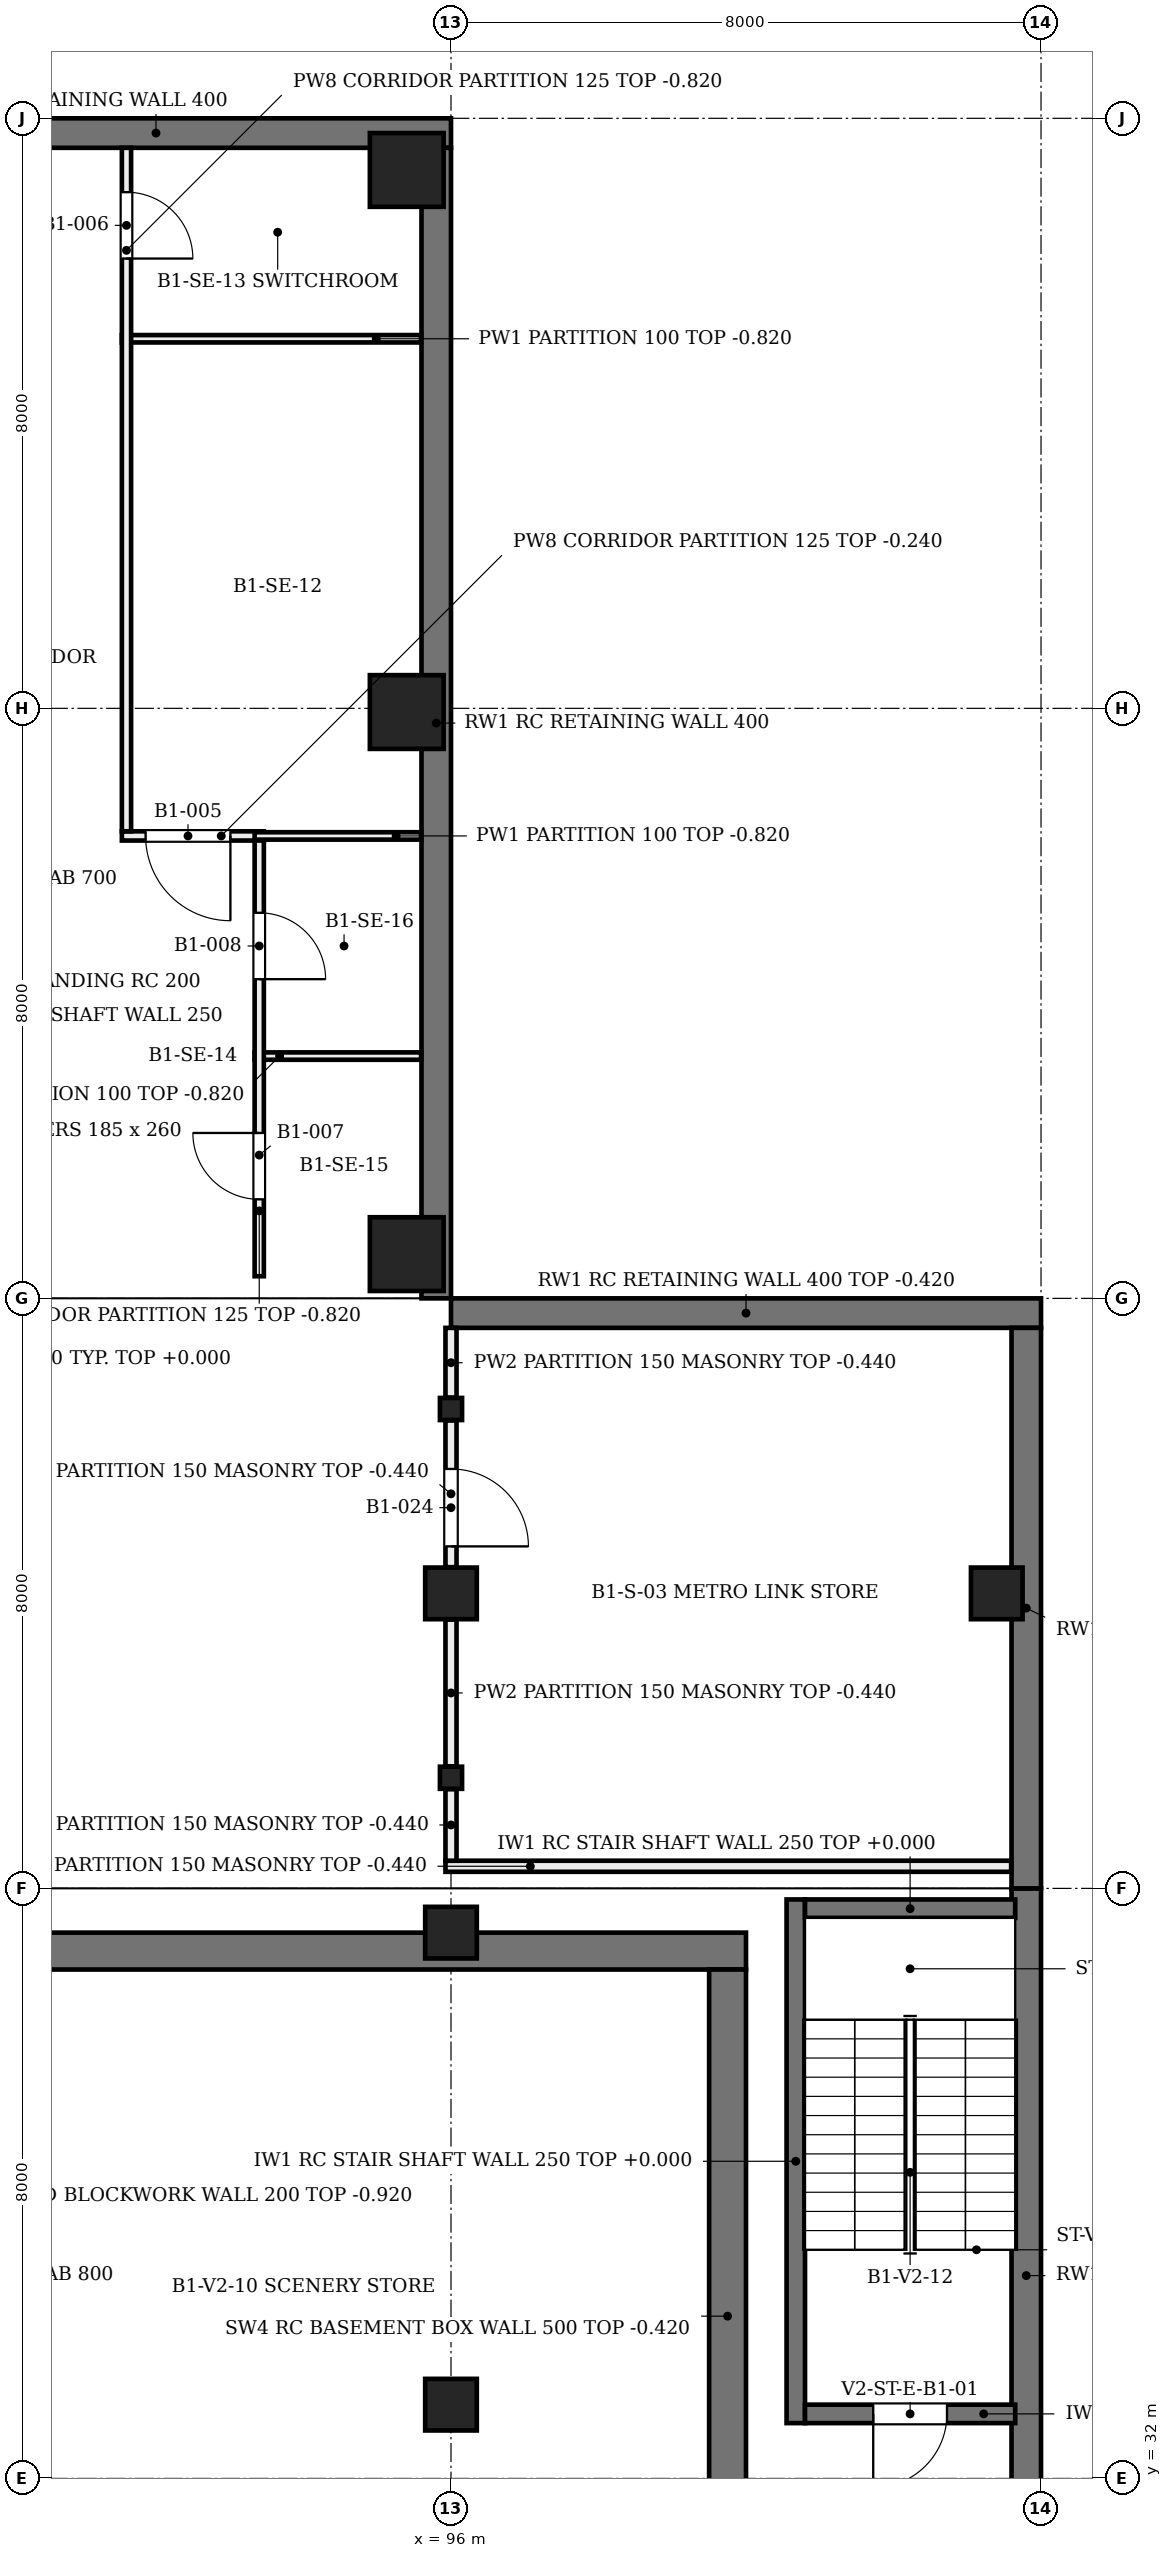
"""IFC4 building model, lengths in metres.
Left out: names, types, materials, properties, quantities, classifications, styles, units other than length and angle.
Written with IfcOpenShell. Run it as: python <this file> out.ifc"""

import sys

from ifc_helpers import new_model, si_unit, direction, frame, frame_2d, origin, origin_2d, place, context, subcontext, project, spatial, rectangle, extrude, element, fill, save


model = new_model("IFC4")
c1 = context("Model", 3, precision=1e-05, world=origin(), true_north=direction((0.0, 1.0)))
c2 = subcontext(c1, "Body", "Model", "MODEL_VIEW")
j1 = project(units=[si_unit("LENGTHUNIT", "METRE"), si_unit("PLANEANGLEUNIT", "RADIAN")], contexts=[c1])
p1 = place(None, origin())
s1 = spatial("IfcSite", under=j1, at=p1, CompositionType="ELEMENT")
p2 = place(p1, origin())
s2 = spatial("IfcBuilding", under=s1, at=p2, CompositionType="ELEMENT")
p3 = place(p2, frame((0.0, 0.0, -4.8)))
s3 = spatial("IfcBuildingStorey", under=s2, at=p3, CompositionType="ELEMENT", Elevation=-4.8)
p4 = place(p3, frame((76.0, 39.15, 0.0), z_axis=(0.0, 0.0, 1.0), x_axis=(1.0, 0.0, 0.0)))
e1 = element("IfcWall", 1, at=p4, inside=s3, PredefinedType="SHEAR", context=c2, shape_type="SweptSolid", body=[
    extrude(rectangle(XDim=24.0, YDim=0.5, at=frame_2d((12.0, 0.0))), origin(), (0.0, 0.0, 1.0), 4.38),
])
p5 = place(p3, frame((99.75, 16.5, 0.0), z_axis=(0.0, 0.0, 1.0), x_axis=(0.0, 1.0, 0.0)))
e2 = element("IfcWall", 2, at=p5, inside=s3, PredefinedType="SHEAR", context=c2, shape_type="SweptSolid", body=[
    extrude(rectangle(XDim=22.4, YDim=0.5, at=frame_2d((11.2, 0.0))), origin(), (0.0, 0.0, 1.0), 4.38),
])
p6 = place(p5, frame((4.575, 0.0, 0.0)))
e3 = element("IfcOpeningElement", 3, at=p6, cuts=e2, PredefinedType="OPENING", context=c2, shape_type="SweptSolid", body=[
    extrude(rectangle(XDim=1.4, YDim=2.4, at=frame_2d((0.7, 1.2))), frame((0.0, 0.26, 0.0), z_axis=(0.0, -1.0, 0.0), x_axis=(1.0, 0.0, 0.0)), (0.0, 0.0, 1.0), 0.52),
])
p7 = place(p5, frame((12.9, 0.0, 0.0)))
e4 = element("IfcOpeningElement", 4, at=p7, cuts=e2, PredefinedType="OPENING", context=c2, shape_type="SweptSolid", body=[
    extrude(rectangle(XDim=1.4, YDim=2.7, at=frame_2d((0.7, 1.35))), frame((0.0, 0.26, 0.0), z_axis=(0.0, -1.0, 0.0), x_axis=(1.0, 0.0, 0.0)), (0.0, 0.0, 1.0), 0.52),
])
for number, where, z_axis, x_axis in (
    (5, (95.4, 48.6, 0.0), (0.0, 0.0, 1.0), (1.0, 0.0, 0.0)),
    (6, (95.4, 55.95, 0.0), (0.0, 0.0, 1.0), (1.0, 0.0, 0.0)),
    (7, (95.4, 63.3, 0.0), (0.0, 0.0, 1.0), (1.0, 0.0, 0.0)),
):
    element("IfcColumn", number, at=place(p3, frame(where, z_axis=z_axis, x_axis=x_axis)), inside=s3, PredefinedType="COLUMN", context=c2, shape_type="SweptSolid", body=[
        extrude(rectangle(XDim=1.0, YDim=1.0, at=origin_2d()), origin(), (0.0, 0.0, 1.0), 4.8),
    ])
p8 = place(p3, frame((96.0, 47.8, 0.0), z_axis=(0.0, 0.0, 1.0), x_axis=(1.0, 0.0, 0.0)))
e8 = element("IfcWall", 8, at=p8, inside=s3, PredefinedType="SOLIDWALL", context=c2, shape_type="SweptSolid", body=[
    extrude(rectangle(XDim=8.0, YDim=0.4, at=frame_2d((4.0, 0.0))), origin(), (0.0, 0.0, 1.0), 4.38),
])
p9 = place(p3, frame((103.8, -1.6, 0.0), z_axis=(0.0, 0.0, 1.0), x_axis=(0.0, 1.0, 0.0)))
e9 = element("IfcWall", 9, at=p9, inside=s3, PredefinedType="SOLIDWALL", context=c2, shape_type="SweptSolid", body=[
    extrude(rectangle(XDim=41.6, YDim=0.4, at=frame_2d((20.8, 0.0))), origin(), (0.0, 0.0, 1.0), 4.38),
])
p10 = place(p3, frame((103.8, 40.0, 0.0), z_axis=(0.0, 0.0, 1.0), x_axis=(0.0, 1.0, 0.0)))
e10 = element("IfcWall", 10, at=p10, inside=s3, PredefinedType="SOLIDWALL", context=c2, shape_type="SweptSolid", body=[
    extrude(rectangle(XDim=7.6, YDim=0.4, at=frame_2d((3.8, 0.0))), origin(), (0.0, 0.0, 1.0), 4.38),
])
p11 = place(p3, frame((88.0, 63.8, 0.0), z_axis=(0.0, 0.0, 1.0), x_axis=(1.0, 0.0, 0.0)))
e11 = element("IfcWall", 11, at=p11, inside=s3, PredefinedType="SOLIDWALL", context=c2, shape_type="SweptSolid", body=[
    extrude(rectangle(XDim=8.0, YDim=0.4, at=frame_2d((4.0, 0.0))), origin(), (0.0, 0.0, 1.0), 4.55),
])
p12 = place(p3, frame((95.8, 48.0, 0.0), z_axis=(0.0, 0.0, 1.0), x_axis=(0.0, 1.0, 0.0)))
e12 = element("IfcWall", 12, at=p12, inside=s3, PredefinedType="SOLIDWALL", context=c2, shape_type="SweptSolid", body=[
    extrude(rectangle(XDim=15.6, YDim=0.4, at=frame_2d((7.8, 0.0))), origin(), (0.0, 0.0, 1.0), 4.55),
])
for number, where, z_axis, x_axis in (
    (13, (96.0, 33.0, 0.0), (0.0, 0.0, 1.0), (1.0, 0.0, 0.0)),
    (14, (96.0, 39.4, 0.0), (0.0, 0.0, 1.0), (1.0, 0.0, 0.0)),
    (15, (96.0, 44.0, 0.0), (0.0, 0.0, 1.0), (1.0, 0.0, 0.0)),
    (16, (103.4, 44.0, 0.0), (0.0, 0.0, 1.0), (1.0, 0.0, 0.0)),
):
    element("IfcColumn", number, at=place(p3, frame(where, z_axis=z_axis, x_axis=x_axis)), inside=s3, PredefinedType="COLUMN", context=c2, shape_type="SweptSolid", body=[
        extrude(rectangle(XDim=0.7, YDim=0.7, at=origin_2d()), origin(), (0.0, 0.0, 1.0), 4.38),
    ])
for number, where, z_axis, x_axis in (
    (17, (96.0, 41.5, 0.0), (0.0, 0.0, 1.0), (1.0, 0.0, 0.0)),
    (18, (96.0, 46.5, 0.0), (0.0, 0.0, 1.0), (1.0, 0.0, 0.0)),
):
    element("IfcColumn", number, at=place(p3, frame(where, z_axis=z_axis, x_axis=x_axis)), inside=s3, PredefinedType="COLUMN", context=c2, shape_type="SweptSolid", body=[
        extrude(rectangle(XDim=0.3, YDim=0.3, at=origin_2d()), origin(), (0.0, 0.0, 1.0), 4.38),
    ])
p13 = place(p3, frame((100.675, 32.75, 0.0), z_axis=(0.0, 0.0, 1.0), x_axis=(0.0, 1.0, 0.0)))
e19 = element("IfcWall", 19, at=p13, inside=s3, PredefinedType="SOLIDWALL", context=c2, shape_type="SweptSolid", body=[
    extrude(rectangle(XDim=7.1, YDim=0.25, at=frame_2d((3.55, 0.0))), origin(), (0.0, 0.0, 1.0), 4.8),
])
p14 = place(p3, frame((100.8, 32.875, 0.0), z_axis=(0.0, 0.0, 1.0), x_axis=(1.0, 0.0, 0.0)))
e20 = element("IfcWall", 20, at=p14, inside=s3, PredefinedType="SOLIDWALL", context=c2, shape_type="SweptSolid", body=[
    extrude(rectangle(XDim=2.85, YDim=0.25, at=frame_2d((1.425, 0.0))), origin(), (0.0, 0.0, 1.0), 4.8),
])
p15 = place(p14, frame((0.925, 0.0, 0.0)))
e21 = element("IfcOpeningElement", 21, at=p15, cuts=e20, PredefinedType="OPENING", context=c2, shape_type="SweptSolid", body=[
    extrude(rectangle(XDim=1.0, YDim=2.1, at=frame_2d((0.5, 1.05))), frame((0.0, 0.135, 0.0), z_axis=(0.0, -1.0, 0.0), x_axis=(1.0, 0.0, 0.0)), (0.0, 0.0, 1.0), 0.27),
])
p16 = place(p3, frame((100.8, 39.725, 0.0), z_axis=(0.0, 0.0, 1.0), x_axis=(1.0, 0.0, 0.0)))
e22 = element("IfcWall", 22, at=p16, inside=s3, PredefinedType="SOLIDWALL", context=c2, shape_type="SweptSolid", body=[
    extrude(rectangle(XDim=2.85, YDim=0.25, at=frame_2d((1.425, 0.0))), origin(), (0.0, 0.0, 1.0), 4.8),
])
p17 = place(p3, frame((91.538, 54.27, 0.0), z_axis=(0.0, 0.0, 1.0), x_axis=(1.0, 0.0, 0.0)))
e23 = element("IfcWall", 23, at=p17, inside=s3, PredefinedType="PARTITIONING", context=c2, shape_type="SweptSolid", body=[
    extrude(rectangle(XDim=1.925, YDim=0.125, at=frame_2d((0.962, 0.0))), origin(), (0.0, 0.0, 1.0), 4.56),
])
p18 = place(p17, frame((0.322, 0.0, 0.0)))
e24 = element("IfcOpeningElement", 24, at=p18, cuts=e23, PredefinedType="OPENING", context=c2, shape_type="SweptSolid", body=[
    extrude(rectangle(XDim=1.15, YDim=2.1, at=frame_2d((0.575, 1.05))), frame((0.0, 0.073, 0.0), z_axis=(0.0, -1.0, 0.0), x_axis=(1.0, 0.0, 0.0)), (0.0, 0.0, 1.0), 0.145),
])
p19 = place(p3, frame((93.337, 54.27, 0.0), z_axis=(0.0, 0.0, 1.0), x_axis=(1.0, 0.0, 0.0)))
e25 = element("IfcWall", 25, at=p19, inside=s3, PredefinedType="PARTITIONING", context=c2, shape_type="SweptSolid", body=[
    extrude(rectangle(XDim=2.258, YDim=0.1, at=frame_2d((1.129, 0.0))), origin(), (0.0, 0.0, 1.0), 3.98),
])
p20 = place(p3, frame((91.538, 61.011, 0.0), z_axis=(0.0, 0.0, 1.0), x_axis=(1.0, 0.0, 0.0)))
e26 = element("IfcWall", 26, at=p20, inside=s3, PredefinedType="PARTITIONING", context=c2, shape_type="SweptSolid", body=[
    extrude(rectangle(XDim=4.057, YDim=0.1, at=frame_2d((2.029, 0.0))), origin(), (0.0, 0.0, 1.0), 3.98),
])
p21 = place(p3, frame((93.337, 51.285, 0.0), z_axis=(0.0, 0.0, 1.0), x_axis=(1.0, 0.0, 0.0)))
e27 = element("IfcWall", 27, at=p21, inside=s3, PredefinedType="PARTITIONING", context=c2, shape_type="SweptSolid", body=[
    extrude(rectangle(XDim=2.258, YDim=0.1, at=frame_2d((1.129, 0.0))), origin(), (0.0, 0.0, 1.0), 3.98),
])
p22 = place(p3, frame((91.6, 54.333, 0.0), z_axis=(0.0, 0.0, 1.0), x_axis=(0.0, 1.0, 0.0)))
e28 = element("IfcWall", 28, at=p22, inside=s3, PredefinedType="PARTITIONING", context=c2, shape_type="SweptSolid", body=[
    extrude(rectangle(XDim=9.267, YDim=0.125, at=frame_2d((4.634, 0.0))), origin(), (0.0, 0.0, 1.0), 3.98),
])
p23 = place(p22, frame((7.766, 0.0, 0.0)))
e29 = element("IfcOpeningElement", 29, at=p23, cuts=e28, PredefinedType="OPENING", context=c2, shape_type="SweptSolid", body=[
    extrude(rectangle(XDim=0.9, YDim=2.1, at=frame_2d((0.45, 1.05))), frame((0.0, 0.073, 0.0), z_axis=(0.0, -1.0, 0.0), x_axis=(1.0, 0.0, 0.0)), (0.0, 0.0, 1.0), 0.145),
])
p24 = place(p3, frame((93.4, 48.3, 0.0), z_axis=(0.0, 0.0, 1.0), x_axis=(0.0, 1.0, 0.0)))
e30 = element("IfcWall", 30, at=p24, inside=s3, PredefinedType="PARTITIONING", context=c2, shape_type="SweptSolid", body=[
    extrude(rectangle(XDim=5.908, YDim=0.125, at=frame_2d((2.954, 0.0))), origin(), (0.0, 0.0, 1.0), 3.98),
])
p25 = place(p24, frame((1.042, 0.0, 0.0)))
e31 = element("IfcOpeningElement", 31, at=p25, cuts=e30, PredefinedType="OPENING", context=c2, shape_type="SweptSolid", body=[
    extrude(rectangle(XDim=0.9, YDim=2.1, at=frame_2d((0.45, 1.05))), frame((0.0, 0.073, 0.0), z_axis=(0.0, -1.0, 0.0), x_axis=(1.0, 0.0, 0.0)), (0.0, 0.0, 1.0), 0.145),
])
p26 = place(p24, frame((4.028, 0.0, 0.0)))
e32 = element("IfcOpeningElement", 32, at=p26, cuts=e30, PredefinedType="OPENING", context=c2, shape_type="SweptSolid", body=[
    extrude(rectangle(XDim=0.9, YDim=2.1, at=frame_2d((0.45, 1.05))), frame((0.0, 0.073, 0.0), z_axis=(0.0, -1.0, 0.0), x_axis=(1.0, 0.0, 0.0)), (0.0, 0.0, 1.0), 0.145),
])
p27 = place(p3, frame((95.925, 40.3, 0.0), z_axis=(0.0, 0.0, 1.0), x_axis=(1.0, 0.0, 0.0)))
e33 = element("IfcWall", 33, at=p27, inside=s3, PredefinedType="PARTITIONING", context=c2, shape_type="SweptSolid", body=[
    extrude(rectangle(XDim=7.67, YDim=0.15, at=frame_2d((3.835, 0.0))), origin(), (0.0, 0.0, 1.0), 4.36),
])
p28 = place(p3, frame((96.0, 40.375, 0.0), z_axis=(0.0, 0.0, 1.0), x_axis=(0.0, 1.0, 0.0)))
e34 = element("IfcWall", 34, at=p28, inside=s3, PredefinedType="PARTITIONING", context=c2, shape_type="SweptSolid", body=[
    extrude(rectangle(XDim=0.97, YDim=0.15, at=frame_2d((0.485, 0.0))), origin(), (0.0, 0.0, 1.0), 4.36),
])
p29 = place(p3, frame((96.0, 41.655, 0.0), z_axis=(0.0, 0.0, 1.0), x_axis=(0.0, 1.0, 0.0)))
e35 = element("IfcWall", 35, at=p29, inside=s3, PredefinedType="PARTITIONING", context=c2, shape_type="SweptSolid", body=[
    extrude(rectangle(XDim=1.99, YDim=0.15, at=frame_2d((0.995, 0.0))), origin(), (0.0, 0.0, 1.0), 4.36),
])
p30 = place(p3, frame((96.0, 44.355, 0.0), z_axis=(0.0, 0.0, 1.0), x_axis=(0.0, 1.0, 0.0)))
e36 = element("IfcWall", 36, at=p30, inside=s3, PredefinedType="PARTITIONING", context=c2, shape_type="SweptSolid", body=[
    extrude(rectangle(XDim=1.99, YDim=0.15, at=frame_2d((0.995, 0.0))), origin(), (0.0, 0.0, 1.0), 4.36),
])
p31 = place(p30, frame((0.282, 0.0, 0.0)))
e37 = element("IfcOpeningElement", 37, at=p31, cuts=e36, PredefinedType="OPENING", context=c2, shape_type="SweptSolid", body=[
    extrude(rectangle(XDim=1.05, YDim=2.1, at=frame_2d((0.525, 1.05))), frame((0.0, 0.085, 0.0), z_axis=(0.0, -1.0, 0.0), x_axis=(1.0, 0.0, 0.0)), (0.0, 0.0, 1.0), 0.17),
])
p32 = place(p3, frame((96.0, 46.655, 0.0), z_axis=(0.0, 0.0, 1.0), x_axis=(0.0, 1.0, 0.0)))
e38 = element("IfcWall", 38, at=p32, inside=s3, PredefinedType="PARTITIONING", context=c2, shape_type="SweptSolid", body=[
    extrude(rectangle(XDim=0.945, YDim=0.15, at=frame_2d((0.473, 0.0))), origin(), (0.0, 0.0, 1.0), 4.36),
])
p33 = place(p15, frame((1.0, 0.0, 0.0), z_axis=(0.0, 0.0, 1.0), x_axis=(-1.0, 0.0, 0.0)))
e39 = element("IfcDoor", 39, at=p33, inside=s3, OperationType="SINGLE_SWING_LEFT", PredefinedType="DOOR", context=c2, shape_type="SweptSolid", body=[
    extrude(rectangle(XDim=1.0, YDim=2.1, at=frame_2d((0.5, 1.05))), frame((0.0, 0.025, 0.0), z_axis=(0.0, -1.0, 0.0), x_axis=(1.0, 0.0, 0.0)), (0.0, 0.0, 1.0), 0.05),
])
fill(e21, e39)
p34 = place(p18, origin())
e40 = element("IfcDoor", 40, at=p34, inside=s3, OperationType="SINGLE_SWING_RIGHT", PredefinedType="DOOR", context=c2, shape_type="SweptSolid", body=[
    extrude(rectangle(XDim=1.15, YDim=2.1, at=frame_2d((0.575, 1.05))), frame((0.0, 0.025, 0.0), z_axis=(0.0, -1.0, 0.0), x_axis=(1.0, 0.0, 0.0)), (0.0, 0.0, 1.0), 0.05),
])
fill(e24, e40)
p35 = place(p23, frame((0.9, 0.0, 0.0), z_axis=(0.0, 0.0, 1.0), x_axis=(-1.0, 0.0, 0.0)))
e41 = element("IfcDoor", 41, at=p35, inside=s3, OperationType="SINGLE_SWING_LEFT", PredefinedType="DOOR", context=c2, shape_type="SweptSolid", body=[
    extrude(rectangle(XDim=0.9, YDim=2.1, at=frame_2d((0.45, 1.05))), frame((0.0, 0.025, 0.0), z_axis=(0.0, -1.0, 0.0), x_axis=(1.0, 0.0, 0.0)), (0.0, 0.0, 1.0), 0.05),
])
fill(e29, e41)
p36 = place(p25, frame((0.9, 0.0, 0.0), z_axis=(0.0, 0.0, 1.0), x_axis=(-1.0, 0.0, 0.0)))
e42 = element("IfcDoor", 42, at=p36, inside=s3, OperationType="SINGLE_SWING_RIGHT", PredefinedType="DOOR", context=c2, shape_type="SweptSolid", body=[
    extrude(rectangle(XDim=0.9, YDim=2.1, at=frame_2d((0.45, 1.05))), frame((0.0, 0.025, 0.0), z_axis=(0.0, -1.0, 0.0), x_axis=(1.0, 0.0, 0.0)), (0.0, 0.0, 1.0), 0.05),
])
fill(e31, e42)
p37 = place(p26, frame((0.9, 0.0, 0.0), z_axis=(0.0, 0.0, 1.0), x_axis=(-1.0, 0.0, 0.0)))
e43 = element("IfcDoor", 43, at=p37, inside=s3, OperationType="SINGLE_SWING_LEFT", PredefinedType="DOOR", context=c2, shape_type="SweptSolid", body=[
    extrude(rectangle(XDim=0.9, YDim=2.1, at=frame_2d((0.45, 1.05))), frame((0.0, 0.025, 0.0), z_axis=(0.0, -1.0, 0.0), x_axis=(1.0, 0.0, 0.0)), (0.0, 0.0, 1.0), 0.05),
])
fill(e32, e43)
p38 = place(p31, frame((1.05, 0.0, 0.0), z_axis=(0.0, 0.0, 1.0), x_axis=(-1.0, 0.0, 0.0)))
e44 = element("IfcDoor", 44, at=p38, inside=s3, OperationType="SINGLE_SWING_LEFT", PredefinedType="DOOR", context=c2, shape_type="SweptSolid", body=[
    extrude(rectangle(XDim=1.05, YDim=2.1, at=frame_2d((0.525, 1.05))), frame((0.0, 0.025, 0.0), z_axis=(0.0, -1.0, 0.0), x_axis=(1.0, 0.0, 0.0)), (0.0, 0.0, 1.0), 0.05),
])
fill(e37, e44)
save(model, sys.argv[1])
